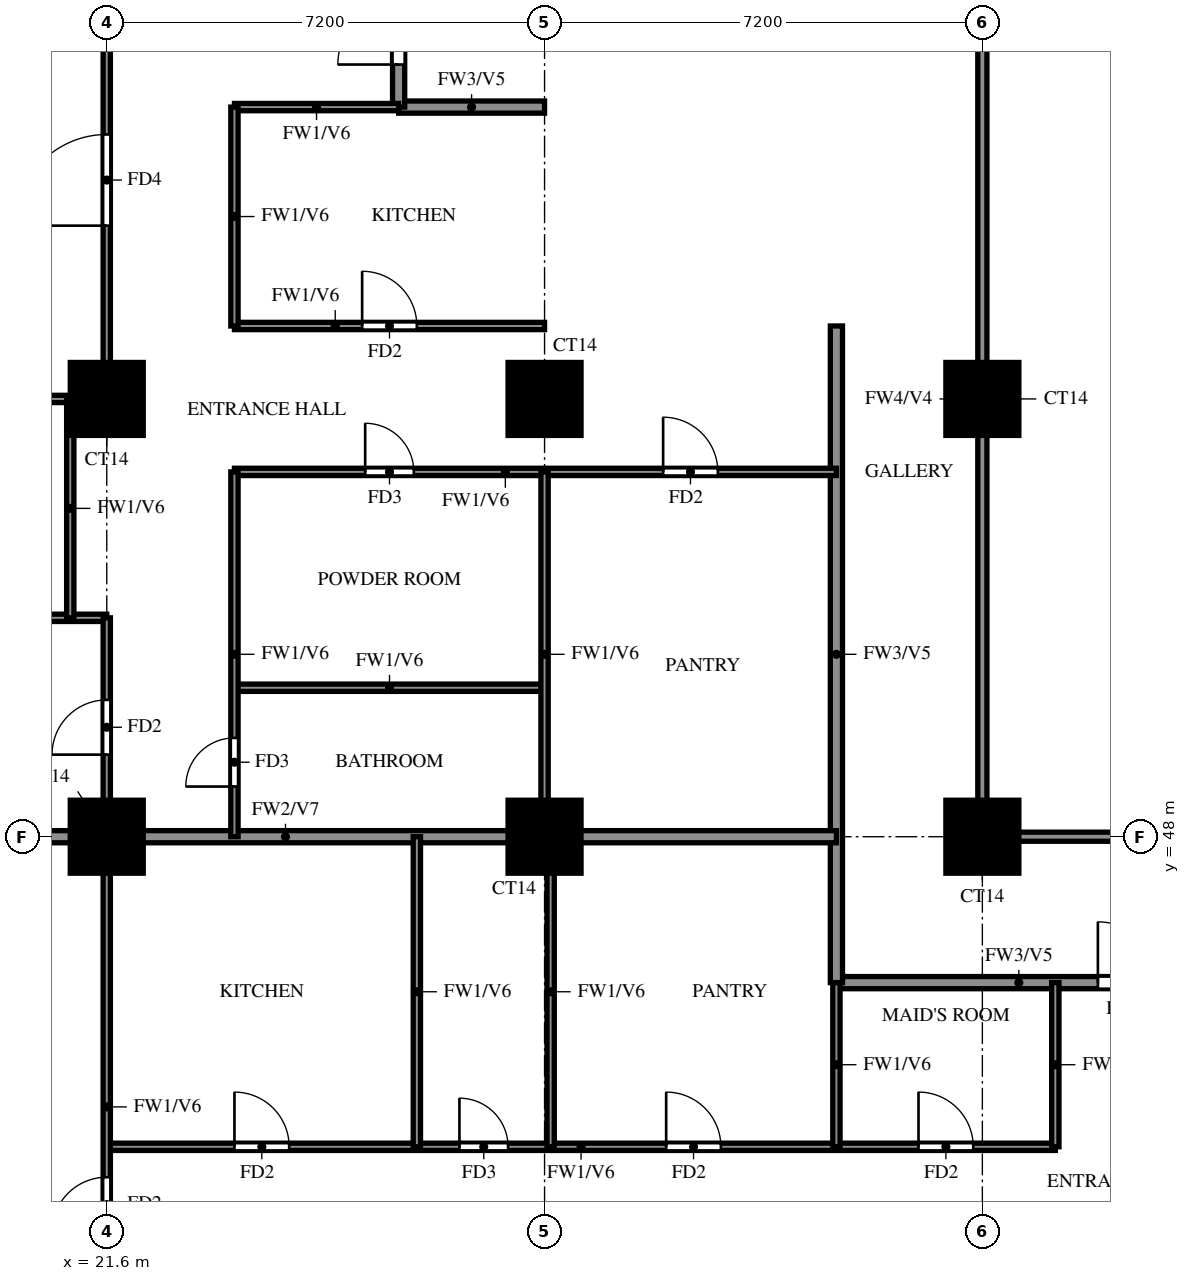
"""IFC4 building model, lengths in metres.
Left out: names, types, materials, properties, quantities, classifications, styles, units other than length and angle.
Written with IfcOpenShell. Run it as: python <this file> out.ifc"""

import sys

from ifc_helpers import new_model, si_unit, direction, frame, frame_2d, origin, origin_2d, place, context, subcontext, project, spatial, rectangle, extrude, source, transform, mapped, element, fill, save


model = new_model("IFC4")
c1 = context("Model", 3, precision=1e-05, world=origin(), true_north=direction((0.0, 1.0)))
c2 = subcontext(c1, "Body", "Model", "MODEL_VIEW")
j1 = project(units=[si_unit("LENGTHUNIT", "METRE"), si_unit("PLANEANGLEUNIT", "RADIAN")], contexts=[c1])
p1 = place(None, origin())
s1 = spatial("IfcSite", under=j1, at=p1, CompositionType="ELEMENT")
p2 = place(p1, origin())
s2 = spatial("IfcBuilding", under=s1, at=p2, CompositionType="ELEMENT")
p3 = place(p2, frame((0.0, 0.0, 104.0)))
s3 = spatial("IfcBuildingStorey", under=s2, at=p3, CompositionType="ELEMENT", Elevation=104.0)
m1 = source(origin(), c2, "Body", "SweptSolid", [
    extrude(rectangle(XDim=1.2, YDim=1.2, at=origin_2d()), origin(), (0.0, 0.0, 1.0), 3.1),
])
for number, where, z_axis, x_axis in (
    (1, (21.6, 48.0, 0.0), (0.0, 0.0, 1.0), (1.0, 0.0, 0.0)),
    (2, (28.8, 48.0, 0.0), (0.0, 0.0, 1.0), (1.0, 0.0, 0.0)),
    (3, (36.0, 48.0, 0.0), (0.0, 0.0, 1.0), (1.0, 0.0, 0.0)),
    (4, (21.6, 55.2, 0.0), (0.0, 0.0, 1.0), (1.0, 0.0, 0.0)),
    (5, (28.8, 55.2, 0.0), (0.0, 0.0, 1.0), (1.0, 0.0, 0.0)),
    (6, (36.0, 55.2, 0.0), (0.0, 0.0, 1.0), (1.0, 0.0, 0.0)),
):
    element("IfcColumn", number, at=place(p3, frame(where, z_axis=z_axis, x_axis=x_axis)), inside=s3, PredefinedType="COLUMN", context=c2, shape_type="MappedRepresentation", body=[
        mapped(m1, transform((0.0, 0.0, 0.0))),
    ])
p4 = place(p3, frame((33.6, 45.6, 0.0), z_axis=(0.0, 0.0, 1.0), x_axis=(1.0, 0.0, 0.0)))
e7 = element("IfcWall", 7, at=p4, inside=s3, PredefinedType="SOLIDWALL", context=c2, shape_type="SweptSolid", body=[
    extrude(rectangle(XDim=6.0, YDim=0.2, at=frame_2d((3.0, 0.0))), origin(), (0.0, 0.0, 1.0), 3.1),
])
p5 = place(p4, frame((4.3, 0.0, 0.0)))
e8 = element("IfcOpeningElement", 8, at=p5, cuts=e7, PredefinedType="OPENING", context=c2, shape_type="SweptSolid", body=[
    extrude(rectangle(XDim=1.0, YDim=2.1, at=frame_2d((0.5, 1.05))), frame((0.0, 0.11, 0.0), z_axis=(0.0, -1.0, 0.0), x_axis=(1.0, 0.0, 0.0)), (0.0, 0.0, 1.0), 0.22),
])
p6 = place(p3, frame((26.4, 60.0, 0.0), z_axis=(0.0, 0.0, 1.0), x_axis=(1.0, 0.0, 0.0)))
e9 = element("IfcWall", 9, at=p6, inside=s3, PredefinedType="SOLIDWALL", context=c2, shape_type="SweptSolid", body=[
    extrude(rectangle(XDim=2.4, YDim=0.2, at=frame_2d((1.2, 0.0))), origin(), (0.0, 0.0, 1.0), 3.1),
])
p7 = place(p3, frame((26.4, 60.0, 0.0), z_axis=(0.0, 0.0, 1.0), x_axis=(0.0, 1.0, 0.0)))
e10 = element("IfcWall", 10, at=p7, inside=s3, PredefinedType="SOLIDWALL", context=c2, shape_type="SweptSolid", body=[
    extrude(rectangle(XDim=9.6, YDim=0.2, at=frame_2d((4.8, 0.0))), origin(), (0.0, 0.0, 1.0), 3.1),
])
p8 = place(p7, frame((0.7, 0.0, 0.0)))
e11 = element("IfcOpeningElement", 11, at=p8, cuts=e10, PredefinedType="OPENING", context=c2, shape_type="SweptSolid", body=[
    extrude(rectangle(XDim=1.0, YDim=2.1, at=frame_2d((0.5, 1.05))), frame((0.0, 0.11, 0.0), z_axis=(0.0, -1.0, 0.0), x_axis=(1.0, 0.0, 0.0)), (0.0, 0.0, 1.0), 0.22),
])
p9 = place(p7, frame((3.1, 0.0, 0.0)))
e12 = element("IfcOpeningElement", 12, at=p9, cuts=e10, PredefinedType="OPENING", context=c2, shape_type="SweptSolid", body=[
    extrude(rectangle(XDim=1.0, YDim=2.1, at=frame_2d((0.5, 1.05))), frame((0.0, 0.11, 0.0), z_axis=(0.0, -1.0, 0.0), x_axis=(1.0, 0.0, 0.0)), (0.0, 0.0, 1.0), 0.22),
])
p10 = place(p3, frame((33.6, 45.6, 0.0), z_axis=(0.0, 0.0, 1.0), x_axis=(0.0, 1.0, 0.0)))
e13 = element("IfcWall", 13, at=p10, inside=s3, PredefinedType="SOLIDWALL", context=c2, shape_type="SweptSolid", body=[
    extrude(rectangle(XDim=10.8, YDim=0.2, at=frame_2d((5.4, 0.0))), origin(), (0.0, 0.0, 1.0), 3.1),
])
p11 = place(p3, frame((14.525, 48.0, 0.0), z_axis=(0.0, 0.0, 1.0), x_axis=(1.0, 0.0, 0.0)))
e14 = element("IfcWall", 14, at=p11, inside=s3, PredefinedType="SOLIDWALL", context=c2, shape_type="SweptSolid", body=[
    extrude(rectangle(XDim=19.075, YDim=0.2, at=frame_2d((9.538, 0.0))), origin(), (0.0, 0.0, 1.0), 3.1),
])
p12 = place(p3, frame((21.6, 42.9, 0.0), z_axis=(0.0, 0.0, 1.0), x_axis=(1.0, 0.0, 0.0)))
e15 = element("IfcWall", 15, at=p12, inside=s3, PredefinedType="PARTITIONING", context=c2, shape_type="SweptSolid", body=[
    extrude(rectangle(XDim=15.6, YDim=0.12, at=frame_2d((7.8, 0.0))), origin(), (0.0, 0.0, 1.0), 3.1),
])
p13 = place(p12, frame((2.1, 0.0, 0.0)))
e16 = element("IfcOpeningElement", 16, at=p13, cuts=e15, PredefinedType="OPENING", context=c2, shape_type="SweptSolid", body=[
    extrude(rectangle(XDim=0.9, YDim=2.1, at=frame_2d((0.45, 1.05))), frame((0.0, 0.07, 0.0), z_axis=(0.0, -1.0, 0.0), x_axis=(1.0, 0.0, 0.0)), (0.0, 0.0, 1.0), 0.14),
])
p14 = place(p12, frame((5.8, 0.0, 0.0)))
e17 = element("IfcOpeningElement", 17, at=p14, cuts=e15, PredefinedType="OPENING", context=c2, shape_type="SweptSolid", body=[
    extrude(rectangle(XDim=0.8, YDim=2.1, at=frame_2d((0.4, 1.05))), frame((0.0, 0.07, 0.0), z_axis=(0.0, -1.0, 0.0), x_axis=(1.0, 0.0, 0.0)), (0.0, 0.0, 1.0), 0.14),
])
p15 = place(p12, frame((9.2, 0.0, 0.0)))
e18 = element("IfcOpeningElement", 18, at=p15, cuts=e15, PredefinedType="OPENING", context=c2, shape_type="SweptSolid", body=[
    extrude(rectangle(XDim=0.9, YDim=2.1, at=frame_2d((0.45, 1.05))), frame((0.0, 0.07, 0.0), z_axis=(0.0, -1.0, 0.0), x_axis=(1.0, 0.0, 0.0)), (0.0, 0.0, 1.0), 0.14),
])
p16 = place(p12, frame((13.35, 0.0, 0.0)))
e19 = element("IfcOpeningElement", 19, at=p16, cuts=e15, PredefinedType="OPENING", context=c2, shape_type="SweptSolid", body=[
    extrude(rectangle(XDim=0.9, YDim=2.1, at=frame_2d((0.45, 1.05))), frame((0.0, 0.07, 0.0), z_axis=(0.0, -1.0, 0.0), x_axis=(1.0, 0.0, 0.0)), (0.0, 0.0, 1.0), 0.14),
])
p17 = place(p3, frame((23.7, 50.45, 0.0), z_axis=(0.0, 0.0, 1.0), x_axis=(1.0, 0.0, 0.0)))
e20 = element("IfcWall", 20, at=p17, inside=s3, PredefinedType="PARTITIONING", context=c2, shape_type="SweptSolid", body=[
    extrude(rectangle(XDim=5.1, YDim=0.12, at=frame_2d((2.55, 0.0))), origin(), (0.0, 0.0, 1.0), 3.1),
])
p18 = place(p3, frame((14.525, 51.6, 0.0), z_axis=(0.0, 0.0, 1.0), x_axis=(1.0, 0.0, 0.0)))
e21 = element("IfcWall", 21, at=p18, inside=s3, PredefinedType="PARTITIONING", context=c2, shape_type="SweptSolid", body=[
    extrude(rectangle(XDim=7.075, YDim=0.12, at=frame_2d((3.538, 0.0))), origin(), (0.0, 0.0, 1.0), 3.1),
])
p19 = place(p18, frame((2.837, 0.0, 0.0)))
e22 = element("IfcOpeningElement", 22, at=p19, cuts=e21, PredefinedType="OPENING", context=c2, shape_type="SweptSolid", body=[
    extrude(rectangle(XDim=0.8, YDim=2.1, at=frame_2d((0.4, 1.05))), frame((0.0, 0.07, 0.0), z_axis=(0.0, -1.0, 0.0), x_axis=(1.0, 0.0, 0.0)), (0.0, 0.0, 1.0), 0.14),
])
p20 = place(p3, frame((23.7, 54.0, 0.0), z_axis=(0.0, 0.0, 1.0), x_axis=(1.0, 0.0, 0.0)))
e23 = element("IfcWall", 23, at=p20, inside=s3, PredefinedType="PARTITIONING", context=c2, shape_type="SweptSolid", body=[
    extrude(rectangle(XDim=9.9, YDim=0.12, at=frame_2d((4.95, 0.0))), origin(), (0.0, 0.0, 1.0), 3.1),
])
p21 = place(p20, frame((2.15, 0.0, 0.0)))
e24 = element("IfcOpeningElement", 24, at=p21, cuts=e23, PredefinedType="OPENING", context=c2, shape_type="SweptSolid", body=[
    extrude(rectangle(XDim=0.8, YDim=2.1, at=frame_2d((0.4, 1.05))), frame((0.0, 0.07, 0.0), z_axis=(0.0, -1.0, 0.0), x_axis=(1.0, 0.0, 0.0)), (0.0, 0.0, 1.0), 0.14),
])
p22 = place(p20, frame((7.05, 0.0, 0.0)))
e25 = element("IfcOpeningElement", 25, at=p22, cuts=e23, PredefinedType="OPENING", context=c2, shape_type="SweptSolid", body=[
    extrude(rectangle(XDim=0.9, YDim=2.1, at=frame_2d((0.45, 1.05))), frame((0.0, 0.07, 0.0), z_axis=(0.0, -1.0, 0.0), x_axis=(1.0, 0.0, 0.0)), (0.0, 0.0, 1.0), 0.14),
])
p23 = place(p3, frame((14.525, 55.2, 0.0), z_axis=(0.0, 0.0, 1.0), x_axis=(1.0, 0.0, 0.0)))
e26 = element("IfcWall", 26, at=p23, inside=s3, PredefinedType="PARTITIONING", context=c2, shape_type="SweptSolid", body=[
    extrude(rectangle(XDim=7.075, YDim=0.12, at=frame_2d((3.538, 0.0))), origin(), (0.0, 0.0, 1.0), 3.1),
])
p24 = place(p3, frame((23.7, 56.4, 0.0), z_axis=(0.0, 0.0, 1.0), x_axis=(1.0, 0.0, 0.0)))
e27 = element("IfcWall", 27, at=p24, inside=s3, PredefinedType="PARTITIONING", context=c2, shape_type="SweptSolid", body=[
    extrude(rectangle(XDim=5.1, YDim=0.12, at=frame_2d((2.55, 0.0))), origin(), (0.0, 0.0, 1.0), 3.1),
])
p25 = place(p24, frame((2.1, 0.0, 0.0)))
e28 = element("IfcOpeningElement", 28, at=p25, cuts=e27, PredefinedType="OPENING", context=c2, shape_type="SweptSolid", body=[
    extrude(rectangle(XDim=0.9, YDim=2.1, at=frame_2d((0.45, 1.05))), frame((0.0, 0.07, 0.0), z_axis=(0.0, -1.0, 0.0), x_axis=(1.0, 0.0, 0.0)), (0.0, 0.0, 1.0), 0.14),
])
p26 = place(p3, frame((23.7, 60.0, 0.0), z_axis=(0.0, 0.0, 1.0), x_axis=(1.0, 0.0, 0.0)))
e29 = element("IfcWall", 29, at=p26, inside=s3, PredefinedType="PARTITIONING", context=c2, shape_type="SweptSolid", body=[
    extrude(rectangle(XDim=2.7, YDim=0.12, at=frame_2d((1.35, 0.0))), origin(), (0.0, 0.0, 1.0), 3.1),
])
p27 = place(p3, frame((21.0, 51.6, 0.0), z_axis=(0.0, 0.0, 1.0), x_axis=(0.0, 1.0, 0.0)))
e30 = element("IfcWall", 30, at=p27, inside=s3, PredefinedType="PARTITIONING", context=c2, shape_type="SweptSolid", body=[
    extrude(rectangle(XDim=3.6, YDim=0.12, at=frame_2d((1.8, 0.0))), origin(), (0.0, 0.0, 1.0), 3.1),
])
p28 = place(p3, frame((21.6, 33.725, 0.0), z_axis=(0.0, 0.0, 1.0), x_axis=(0.0, 1.0, 0.0)))
e31 = element("IfcWall", 31, at=p28, inside=s3, PredefinedType="PARTITIONING", context=c2, shape_type="SweptSolid", body=[
    extrude(rectangle(XDim=17.875, YDim=0.12, at=frame_2d((8.938, 0.0))), origin(), (0.0, 0.0, 1.0), 3.1),
])
p29 = place(p28, frame((7.775, 0.0, 0.0)))
e32 = element("IfcOpeningElement", 32, at=p29, cuts=e31, PredefinedType="OPENING", context=c2, shape_type="SweptSolid", body=[
    extrude(rectangle(XDim=0.9, YDim=2.1, at=frame_2d((0.45, 1.05))), frame((0.0, 0.07, 0.0), z_axis=(0.0, -1.0, 0.0), x_axis=(1.0, 0.0, 0.0)), (0.0, 0.0, 1.0), 0.14),
])
p30 = place(p28, frame((15.625, 0.0, 0.0)))
e33 = element("IfcOpeningElement", 33, at=p30, cuts=e31, PredefinedType="OPENING", context=c2, shape_type="SweptSolid", body=[
    extrude(rectangle(XDim=0.9, YDim=2.1, at=frame_2d((0.45, 1.05))), frame((0.0, 0.07, 0.0), z_axis=(0.0, -1.0, 0.0), x_axis=(1.0, 0.0, 0.0)), (0.0, 0.0, 1.0), 0.14),
])
p31 = place(p3, frame((21.6, 55.2, 0.0), z_axis=(0.0, 0.0, 1.0), x_axis=(0.0, 1.0, 0.0)))
e34 = element("IfcWall", 34, at=p31, inside=s3, PredefinedType="PARTITIONING", context=c2, shape_type="SweptSolid", body=[
    extrude(rectangle(XDim=14.4, YDim=0.12, at=frame_2d((7.2, 0.0))), origin(), (0.0, 0.0, 1.0), 3.1),
])
p32 = place(p31, frame((2.85, 0.0, 0.0)))
e35 = element("IfcOpeningElement", 35, at=p32, cuts=e34, PredefinedType="OPENING", context=c2, shape_type="SweptSolid", body=[
    extrude(rectangle(XDim=1.5, YDim=2.1, at=frame_2d((0.75, 1.05))), frame((0.0, 0.07, 0.0), z_axis=(0.0, -1.0, 0.0), x_axis=(1.0, 0.0, 0.0)), (0.0, 0.0, 1.0), 0.14),
])
p33 = place(p31, frame((8.55, 0.0, 0.0)))
e36 = element("IfcOpeningElement", 36, at=p33, cuts=e34, PredefinedType="OPENING", context=c2, shape_type="SweptSolid", body=[
    extrude(rectangle(XDim=0.9, YDim=2.1, at=frame_2d((0.45, 1.05))), frame((0.0, 0.07, 0.0), z_axis=(0.0, -1.0, 0.0), x_axis=(1.0, 0.0, 0.0)), (0.0, 0.0, 1.0), 0.14),
])
p34 = place(p31, frame((12.15, 0.0, 0.0)))
e37 = element("IfcOpeningElement", 37, at=p34, cuts=e34, PredefinedType="OPENING", context=c2, shape_type="SweptSolid", body=[
    extrude(rectangle(XDim=0.9, YDim=2.1, at=frame_2d((0.45, 1.05))), frame((0.0, 0.07, 0.0), z_axis=(0.0, -1.0, 0.0), x_axis=(1.0, 0.0, 0.0)), (0.0, 0.0, 1.0), 0.14),
])
p35 = place(p3, frame((23.7, 48.0, 0.0), z_axis=(0.0, 0.0, 1.0), x_axis=(0.0, 1.0, 0.0)))
e38 = element("IfcWall", 38, at=p35, inside=s3, PredefinedType="PARTITIONING", context=c2, shape_type="SweptSolid", body=[
    extrude(rectangle(XDim=6.0, YDim=0.12, at=frame_2d((3.0, 0.0))), origin(), (0.0, 0.0, 1.0), 3.1),
])
p36 = place(p35, frame((0.825, 0.0, 0.0)))
e39 = element("IfcOpeningElement", 39, at=p36, cuts=e38, PredefinedType="OPENING", context=c2, shape_type="SweptSolid", body=[
    extrude(rectangle(XDim=0.8, YDim=2.1, at=frame_2d((0.4, 1.05))), frame((0.0, 0.07, 0.0), z_axis=(0.0, -1.0, 0.0), x_axis=(1.0, 0.0, 0.0)), (0.0, 0.0, 1.0), 0.14),
])
p37 = place(p3, frame((23.7, 56.4, 0.0), z_axis=(0.0, 0.0, 1.0), x_axis=(0.0, 1.0, 0.0)))
e40 = element("IfcWall", 40, at=p37, inside=s3, PredefinedType="PARTITIONING", context=c2, shape_type="SweptSolid", body=[
    extrude(rectangle(XDim=3.6, YDim=0.12, at=frame_2d((1.8, 0.0))), origin(), (0.0, 0.0, 1.0), 3.1),
])
p38 = place(p3, frame((26.7, 42.9, 0.0), z_axis=(0.0, 0.0, 1.0), x_axis=(0.0, 1.0, 0.0)))
e41 = element("IfcWall", 41, at=p38, inside=s3, PredefinedType="PARTITIONING", context=c2, shape_type="SweptSolid", body=[
    extrude(rectangle(XDim=5.1, YDim=0.12, at=frame_2d((2.55, 0.0))), origin(), (0.0, 0.0, 1.0), 3.1),
])
p39 = place(p3, frame((28.8, 48.0, 0.0), z_axis=(0.0, 0.0, 1.0), x_axis=(0.0, 1.0, 0.0)))
e42 = element("IfcWall", 42, at=p39, inside=s3, PredefinedType="PARTITIONING", context=c2, shape_type="SweptSolid", body=[
    extrude(rectangle(XDim=6.0, YDim=0.12, at=frame_2d((3.0, 0.0))), origin(), (0.0, 0.0, 1.0), 3.1),
])
p40 = place(p3, frame((28.9, 42.9, 0.0), z_axis=(0.0, 0.0, 1.0), x_axis=(0.0, 1.0, 0.0)))
e43 = element("IfcWall", 43, at=p40, inside=s3, PredefinedType="PARTITIONING", context=c2, shape_type="SweptSolid", body=[
    extrude(rectangle(XDim=5.1, YDim=0.12, at=frame_2d((2.55, 0.0))), origin(), (0.0, 0.0, 1.0), 3.1),
])
for number, where, z_axis, x_axis in (
    (44, (33.6, 42.9, 0.0), (0.0, 0.0, 1.0), (0.0, 1.0, 0.0)),
    (45, (37.2, 42.9, 0.0), (0.0, 0.0, 1.0), (0.0, 1.0, 0.0)),
):
    element("IfcWall", number, at=place(p3, frame(where, z_axis=z_axis, x_axis=x_axis)), inside=s3, PredefinedType="PARTITIONING", context=c2, shape_type="SweptSolid", body=[
        extrude(rectangle(XDim=2.7, YDim=0.12, at=frame_2d((1.35, 0.0))), origin(), (0.0, 0.0, 1.0), 3.1),
    ])
p41 = place(p3, frame((36.0, 48.0, 0.0), z_axis=(0.0, 0.0, 1.0), x_axis=(1.0, 0.0, 0.0)))
e46 = element("IfcWall", 46, at=p41, inside=s3, PredefinedType="SOLIDWALL", context=c2, shape_type="SweptSolid", body=[
    extrude(rectangle(XDim=7.2, YDim=0.15, at=frame_2d((3.6, 0.0))), origin(), (0.0, 0.0, 1.0), 2.2),
])
p42 = place(p3, frame((36.0, 48.0, 0.0), z_axis=(0.0, 0.0, 1.0), x_axis=(0.0, 1.0, 0.0)))
e47 = element("IfcWall", 47, at=p42, inside=s3, PredefinedType="SOLIDWALL", context=c2, shape_type="SweptSolid", body=[
    extrude(rectangle(XDim=14.4, YDim=0.15, at=frame_2d((7.2, 0.0))), origin(), (0.0, 0.0, 1.0), 2.2),
])
p43 = place(p5, origin())
e48 = element("IfcDoor", 48, at=p43, inside=s3, OperationType="SINGLE_SWING_RIGHT", PredefinedType="DOOR", context=c2, shape_type="SweptSolid", body=[
    extrude(rectangle(XDim=1.0, YDim=2.1, at=frame_2d((0.5, 1.05))), frame((0.0, 0.025, 0.0), z_axis=(0.0, -1.0, 0.0), x_axis=(1.0, 0.0, 0.0)), (0.0, 0.0, 1.0), 0.05),
])
fill(e8, e48)
p44 = place(p29, origin())
e49 = element("IfcDoor", 49, at=p44, inside=s3, OperationType="SINGLE_SWING_RIGHT", PredefinedType="DOOR", context=c2, shape_type="SweptSolid", body=[
    extrude(rectangle(XDim=0.9, YDim=2.1, at=frame_2d((0.45, 1.05))), frame((0.0, 0.025, 0.0), z_axis=(0.0, -1.0, 0.0), x_axis=(1.0, 0.0, 0.0)), (0.0, 0.0, 1.0), 0.05),
])
fill(e32, e49)
p45 = place(p13, origin())
e50 = element("IfcDoor", 50, at=p45, inside=s3, OperationType="SINGLE_SWING_LEFT", PredefinedType="DOOR", context=c2, shape_type="SweptSolid", body=[
    extrude(rectangle(XDim=0.9, YDim=2.1, at=frame_2d((0.45, 1.05))), frame((0.0, 0.025, 0.0), z_axis=(0.0, -1.0, 0.0), x_axis=(1.0, 0.0, 0.0)), (0.0, 0.0, 1.0), 0.05),
])
fill(e16, e50)
p46 = place(p14, origin())
e51 = element("IfcDoor", 51, at=p46, inside=s3, OperationType="SINGLE_SWING_LEFT", PredefinedType="DOOR", context=c2, shape_type="SweptSolid", body=[
    extrude(rectangle(XDim=0.8, YDim=2.1, at=frame_2d((0.4, 1.05))), frame((0.0, 0.025, 0.0), z_axis=(0.0, -1.0, 0.0), x_axis=(1.0, 0.0, 0.0)), (0.0, 0.0, 1.0), 0.05),
])
fill(e17, e51)
p47 = place(p15, origin())
e52 = element("IfcDoor", 52, at=p47, inside=s3, OperationType="SINGLE_SWING_RIGHT", PredefinedType="DOOR", context=c2, shape_type="SweptSolid", body=[
    extrude(rectangle(XDim=0.9, YDim=2.1, at=frame_2d((0.45, 1.05))), frame((0.0, 0.025, 0.0), z_axis=(0.0, -1.0, 0.0), x_axis=(1.0, 0.0, 0.0)), (0.0, 0.0, 1.0), 0.05),
])
fill(e18, e52)
p48 = place(p16, origin())
e53 = element("IfcDoor", 53, at=p48, inside=s3, OperationType="SINGLE_SWING_LEFT", PredefinedType="DOOR", context=c2, shape_type="SweptSolid", body=[
    extrude(rectangle(XDim=0.9, YDim=2.1, at=frame_2d((0.45, 1.05))), frame((0.0, 0.025, 0.0), z_axis=(0.0, -1.0, 0.0), x_axis=(1.0, 0.0, 0.0)), (0.0, 0.0, 1.0), 0.05),
])
fill(e19, e53)
p49 = place(p8, origin())
e54 = element("IfcDoor", 54, at=p49, inside=s3, OperationType="SINGLE_SWING_LEFT", PredefinedType="DOOR", context=c2, shape_type="SweptSolid", body=[
    extrude(rectangle(XDim=1.0, YDim=2.1, at=frame_2d((0.5, 1.05))), frame((0.0, 0.025, 0.0), z_axis=(0.0, -1.0, 0.0), x_axis=(1.0, 0.0, 0.0)), (0.0, 0.0, 1.0), 0.05),
])
fill(e11, e54)
p50 = place(p30, origin())
e55 = element("IfcDoor", 55, at=p50, inside=s3, OperationType="SINGLE_SWING_RIGHT", PredefinedType="DOOR", context=c2, shape_type="SweptSolid", body=[
    extrude(rectangle(XDim=0.9, YDim=2.1, at=frame_2d((0.45, 1.05))), frame((0.0, 0.025, 0.0), z_axis=(0.0, -1.0, 0.0), x_axis=(1.0, 0.0, 0.0)), (0.0, 0.0, 1.0), 0.05),
])
fill(e33, e55)
p51 = place(p32, origin())
e56 = element("IfcDoor", 56, at=p51, inside=s3, OperationType="SINGLE_SWING_LEFT", PredefinedType="DOOR", context=c2, shape_type="SweptSolid", body=[
    extrude(rectangle(XDim=1.5, YDim=2.1, at=frame_2d((0.75, 1.05))), frame((0.0, 0.025, 0.0), z_axis=(0.0, -1.0, 0.0), x_axis=(1.0, 0.0, 0.0)), (0.0, 0.0, 1.0), 0.05),
])
fill(e35, e56)
p52 = place(p36, origin())
e57 = element("IfcDoor", 57, at=p52, inside=s3, OperationType="SINGLE_SWING_RIGHT", PredefinedType="DOOR", context=c2, shape_type="SweptSolid", body=[
    extrude(rectangle(XDim=0.8, YDim=2.1, at=frame_2d((0.4, 1.05))), frame((0.0, 0.025, 0.0), z_axis=(0.0, -1.0, 0.0), x_axis=(1.0, 0.0, 0.0)), (0.0, 0.0, 1.0), 0.05),
])
fill(e39, e57)
p53 = place(p21, origin())
e58 = element("IfcDoor", 58, at=p53, inside=s3, OperationType="SINGLE_SWING_LEFT", PredefinedType="DOOR", context=c2, shape_type="SweptSolid", body=[
    extrude(rectangle(XDim=0.8, YDim=2.1, at=frame_2d((0.4, 1.05))), frame((0.0, 0.025, 0.0), z_axis=(0.0, -1.0, 0.0), x_axis=(1.0, 0.0, 0.0)), (0.0, 0.0, 1.0), 0.05),
])
fill(e24, e58)
p54 = place(p25, origin())
e59 = element("IfcDoor", 59, at=p54, inside=s3, OperationType="SINGLE_SWING_LEFT", PredefinedType="DOOR", context=c2, shape_type="SweptSolid", body=[
    extrude(rectangle(XDim=0.9, YDim=2.1, at=frame_2d((0.45, 1.05))), frame((0.0, 0.025, 0.0), z_axis=(0.0, -1.0, 0.0), x_axis=(1.0, 0.0, 0.0)), (0.0, 0.0, 1.0), 0.05),
])
fill(e28, e59)
p55 = place(p22, origin())
e60 = element("IfcDoor", 60, at=p55, inside=s3, OperationType="SINGLE_SWING_RIGHT", PredefinedType="DOOR", context=c2, shape_type="SweptSolid", body=[
    extrude(rectangle(XDim=0.9, YDim=2.1, at=frame_2d((0.45, 1.05))), frame((0.0, 0.025, 0.0), z_axis=(0.0, -1.0, 0.0), x_axis=(1.0, 0.0, 0.0)), (0.0, 0.0, 1.0), 0.05),
])
fill(e25, e60)
save(model, sys.argv[1])
